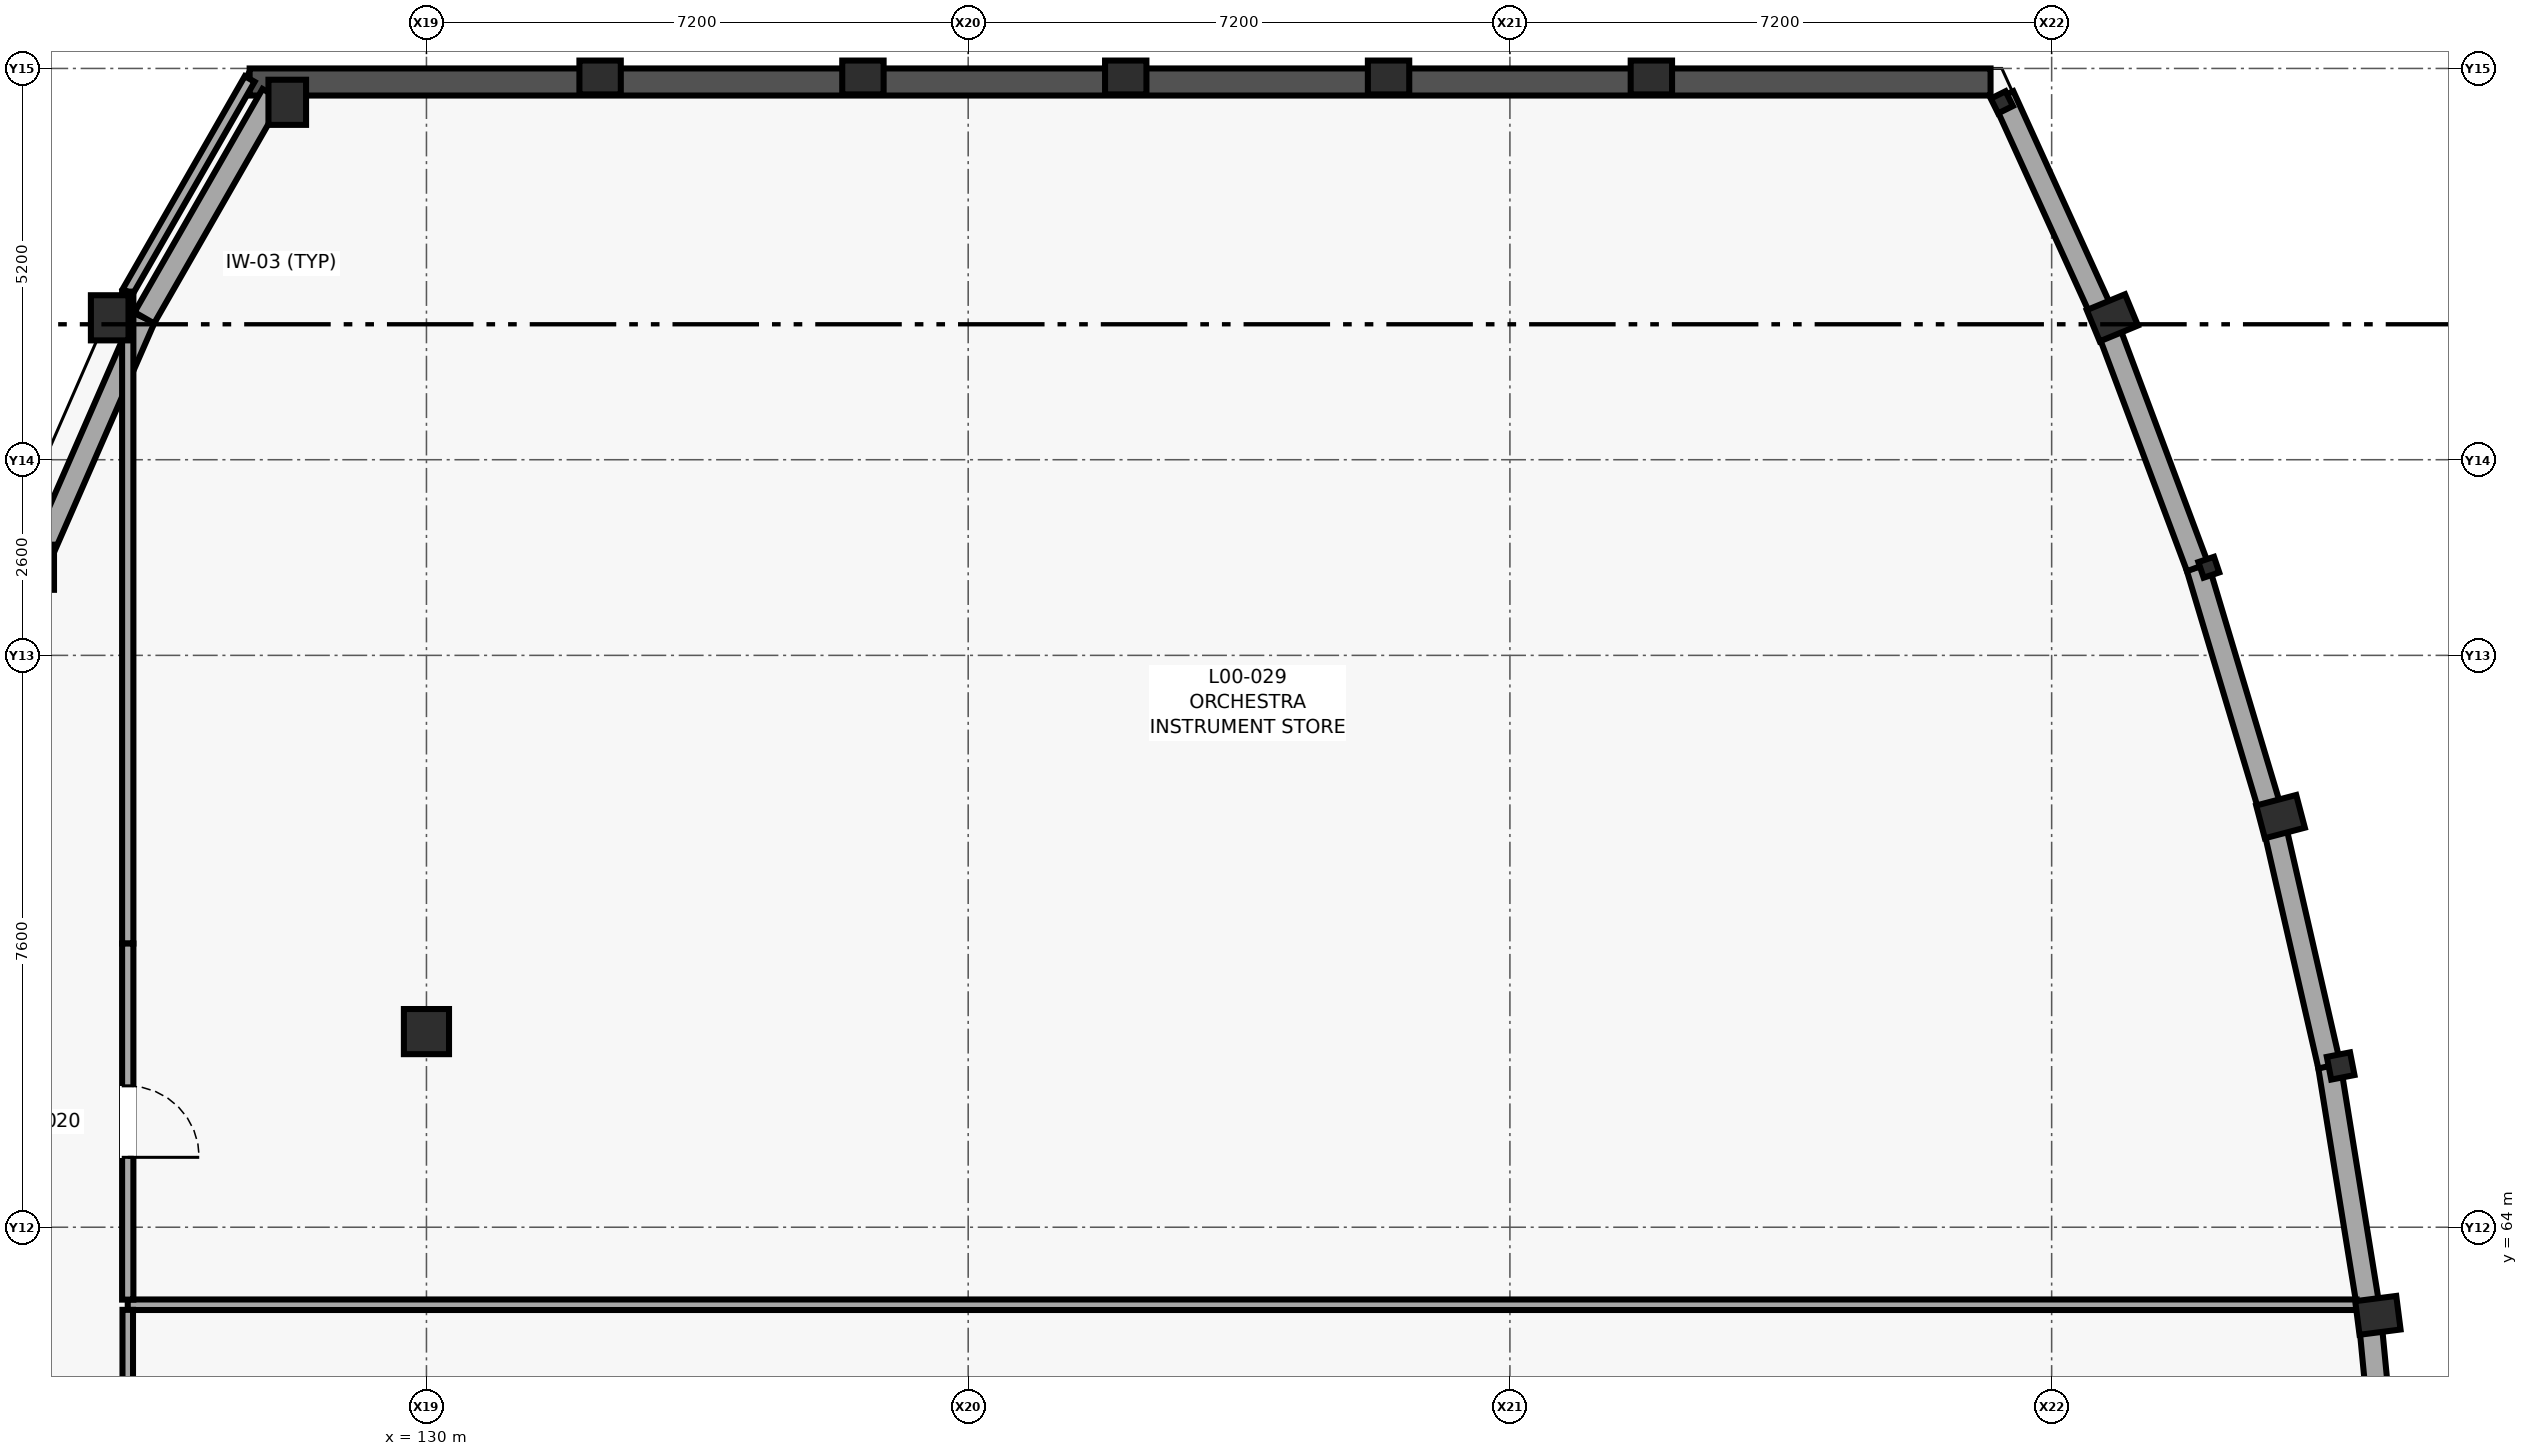
"""IFC4 building model, lengths in metres.
Left out: names, types, materials, properties, quantities, classifications, styles, units other than length and angle.
Written with IfcOpenShell. Run it as: python <this file> out.ifc"""

import sys

from ifc_helpers import new_model, si_unit, direction, frame, frame_2d, origin, origin_2d, place, context, subcontext, project, spatial, rectangle, hollow_circle, i_section, extrude, element, fill, save


model = new_model("IFC4")
c1 = context("Model", 3, precision=1e-05, world=origin(), true_north=direction((0.0, 1.0)))
c2 = subcontext(c1, "Body", "Model", "MODEL_VIEW")
j1 = project(units=[si_unit("LENGTHUNIT", "METRE"), si_unit("PLANEANGLEUNIT", "RADIAN")], contexts=[c1])
p1 = place(None, origin())
s1 = spatial("IfcSite", under=j1, at=p1, CompositionType="ELEMENT")
p2 = place(p1, origin())
s2 = spatial("IfcBuilding", under=s1, at=p2, CompositionType="ELEMENT")
p3 = place(p2, origin())
s3 = spatial("IfcBuildingStorey", under=s2, at=p3, CompositionType="ELEMENT", Elevation=0.0)
for number, where, z_axis, x_axis in (
    (1, (124.8, 72.771, 0.0), (0.0, 0.0, 1.0), (1.0, 0.0, 0.0)),
    (2, (125.79, 76.086, 0.0), (0.0, 0.0, 1.0), (1.0, 0.0, 0.0)),
    (3, (128.15, 78.95, 0.0), (0.0, 0.0, 1.0), (1.0, 0.0, 0.0)),
):
    element("IfcColumn", number, at=place(p3, frame(where, z_axis=z_axis, x_axis=x_axis)), inside=s3, PredefinedType="PILASTER", context=c2, shape_type="SweptSolid", body=[
        extrude(rectangle(XDim=0.5, YDim=0.6, at=origin_2d()), origin(), (0.0, 0.0, 1.0), 4.2),
    ])
p4 = place(p3, frame((130.0, 66.6, 0.0), z_axis=(0.0, 0.0, 1.0), x_axis=(1.0, 0.0, 0.0)))
e4 = element("IfcColumn", 4, at=p4, inside=s3, PredefinedType="COLUMN", context=c2, shape_type="SweptSolid", body=[
    extrude(rectangle(XDim=0.6, YDim=0.6, at=origin_2d()), origin(), (0.0, 0.0, 1.0), 4.2),
])
for number, where, z_axis, x_axis in (
    (5, (132.308, 79.28, 0.0), (0.0, 0.0, 1.0), (0.0, 1.0, 0.0)),
    (6, (135.801, 79.28, 0.0), (0.0, 0.0, 1.0), (0.0, 1.0, 0.0)),
    (7, (139.294, 79.28, 0.0), (0.0, 0.0, 1.0), (0.0, 1.0, 0.0)),
    (8, (142.787, 79.28, 0.0), (0.0, 0.0, 1.0), (0.0, 1.0, 0.0)),
    (9, (146.28, 79.28, 0.0), (0.0, 0.0, 1.0), (0.0, 1.0, 0.0)),
):
    element("IfcColumn", number, at=place(p3, frame(where, z_axis=z_axis, x_axis=x_axis)), inside=s3, PredefinedType="PILASTER", context=c2, shape_type="SweptSolid", body=[
        extrude(rectangle(XDim=0.45, YDim=0.55, at=origin_2d()), origin(), (0.0, 0.0, 1.0), 4.2),
    ])
p5 = place(p3, frame((150.938, 78.95, 0.0), z_axis=(0.0, 0.0, 1.0), x_axis=(-0.44619781311, 0.894934361602, 0.0)))
e10 = element("IfcColumn", 10, at=p5, inside=s3, PredefinedType="PILASTER", context=c2, shape_type="SweptSolid", body=[
    extrude(hollow_circle(Radius=0.11, WallThickness=0.01, at=origin_2d()), origin(), (0.0, 0.0, 1.0), 4.2),
])
p6 = place(p3, frame((152.407, 76.086, 0.0), z_axis=(0.0, 0.0, 1.0), x_axis=(-0.382360914263, 0.92401305794, 0.0)))
e11 = element("IfcColumn", 11, at=p6, inside=s3, PredefinedType="PILASTER", context=c2, shape_type="SweptSolid", body=[
    extrude(rectangle(XDim=0.45, YDim=0.55, at=origin_2d()), origin(), (0.0, 0.0, 1.0), 4.2),
])
p7 = place(p3, frame((153.689, 72.771, 0.0), z_axis=(0.0, 0.0, 1.0), x_axis=(-0.318628456287, 0.947879690069, 0.0)))
e12 = element("IfcColumn", 12, at=p7, inside=s3, PredefinedType="PILASTER", context=c2, shape_type="SweptSolid", body=[
    extrude(hollow_circle(Radius=0.11, WallThickness=0.01, at=origin_2d()), origin(), (0.0, 0.0, 1.0), 4.2),
])
p8 = place(p3, frame((154.642, 69.457, 0.0), z_axis=(0.0, 0.0, 1.0), x_axis=(-0.2549394954, 0.966957007154, 0.0)))
e13 = element("IfcColumn", 13, at=p8, inside=s3, PredefinedType="PILASTER", context=c2, shape_type="SweptSolid", body=[
    extrude(rectangle(XDim=0.45, YDim=0.55, at=origin_2d()), origin(), (0.0, 0.0, 1.0), 4.2),
])
p9 = place(p3, frame((155.441, 66.143, 0.0), z_axis=(0.0, 0.0, 1.0), x_axis=(-0.191151636272, 0.981560518741, 0.0)))
e14 = element("IfcColumn", 14, at=p9, inside=s3, PredefinedType="COLUMN", context=c2, shape_type="SweptSolid", body=[
    extrude(i_section(OverallWidth=0.307, OverallDepth=0.314, WebThickness=0.012, FlangeThickness=0.019, FilletRadius=0.015, at=origin_2d()), origin(), (0.0, 0.0, 1.0), 4.2),
])
p10 = place(p3, frame((155.936, 62.829, 0.0), z_axis=(0.0, 0.0, 1.0), x_axis=(-0.12741083733, 0.991850028246, 0.0)))
e15 = element("IfcColumn", 15, at=p10, inside=s3, PredefinedType="PILASTER", context=c2, shape_type="SweptSolid", body=[
    extrude(rectangle(XDim=0.45, YDim=0.55, at=origin_2d()), origin(), (0.0, 0.0, 1.0), 4.2),
])
p11 = place(p3, frame((156.144, 59.514, 0.0), z_axis=(0.0, 0.0, 1.0), x_axis=(-0.095518246268, 0.995427679256, 0.0)))
e16 = element("IfcWall", 16, at=p11, inside=s3, PredefinedType="SOLIDWALL", context=c2, shape_type="SweptSolid", body=[
    extrude(rectangle(XDim=3.33, YDim=0.3, at=frame_2d((1.665, 0.0))), origin(), (0.0, 0.0, 1.0), 3.68),
])
p12 = place(p11, frame((1.04, 0.0, 1.15)))
e17 = element("IfcOpeningElement", 17, at=p12, cuts=e16, PredefinedType="OPENING", context=c2, shape_type="SweptSolid", body=[
    extrude(rectangle(XDim=1.25, YDim=1.25, at=frame_2d((0.625, 0.625))), frame((0.0, 0.16, 0.0), z_axis=(0.0, -1.0, 0.0), x_axis=(1.0, 0.0, 0.0)), (0.0, 0.0, 1.0), 0.32),
])
p13 = place(p3, frame((155.826, 62.829, 0.0), z_axis=(0.0, 0.0, 1.0), x_axis=(-0.159349054769, 0.987222304623, 0.0)))
e18 = element("IfcWall", 18, at=p13, inside=s3, PredefinedType="SOLIDWALL", context=c2, shape_type="SweptSolid", body=[
    extrude(rectangle(XDim=3.357, YDim=0.3, at=frame_2d((1.678, 0.0))), origin(), (0.0, 0.0, 1.0), 3.68),
])
p14 = place(p3, frame((155.291, 66.143, 0.0), z_axis=(0.0, 0.0, 1.0), x_axis=(-0.223259599234, 0.974759022195, 0.0)))
e19 = element("IfcWall", 19, at=p14, inside=s3, PredefinedType="SOLIDWALL", context=c2, shape_type="SweptSolid", body=[
    extrude(rectangle(XDim=3.4, YDim=0.3, at=frame_2d((1.7, 0.0))), origin(), (0.0, 0.0, 1.0), 3.68),
])
p15 = place(p3, frame((154.532, 69.457, 0.0), z_axis=(0.0, 0.0, 1.0), x_axis=(-0.287011200065, 0.957927226379, 0.0)))
e20 = element("IfcWall", 20, at=p15, inside=s3, PredefinedType="SOLIDWALL", context=c2, shape_type="SweptSolid", body=[
    extrude(rectangle(XDim=3.459, YDim=0.3, at=frame_2d((1.73, 0.0))), origin(), (0.0, 0.0, 1.0), 3.68),
])
p16 = place(p3, frame((153.539, 72.771, 0.0), z_axis=(0.0, 0.0, 1.0), x_axis=(-0.350836219137, 0.936436835746, 0.0)))
e21 = element("IfcWall", 21, at=p16, inside=s3, PredefinedType="SOLIDWALL", context=c2, shape_type="SweptSolid", body=[
    extrude(rectangle(XDim=3.54, YDim=0.3, at=frame_2d((1.77, 0.0))), origin(), (0.0, 0.0, 1.0), 3.68),
])
p17 = place(p3, frame((152.297, 76.086, 0.0), z_axis=(0.0, 0.0, 1.0), x_axis=(-0.414347666712, 0.910118679673, 0.0)))
e22 = element("IfcWall", 22, at=p17, inside=s3, PredefinedType="SOLIDWALL", context=c2, shape_type="SweptSolid", body=[
    extrude(rectangle(XDim=3.241, YDim=0.3, at=frame_2d((1.621, 0.0))), origin(), (0.0, 0.0, 1.0), 3.68),
])
p18 = place(p3, frame((150.788, 79.22, 0.0), z_axis=(0.0, 0.0, 1.0), x_axis=(-1.0, 0.0, 0.0)))
e23 = element("IfcWall", 23, at=p18, inside=s3, PredefinedType="SHEAR", context=c2, shape_type="SweptSolid", body=[
    extrude(rectangle(XDim=23.138, YDim=0.36, at=frame_2d((11.569, 0.0))), origin(), (0.0, 0.0, 1.0), 3.935),
])
p19 = place(p3, frame((126.25, 76.086, 0.0), z_axis=(0.0, 0.0, 1.0), x_axis=(-0.400740958437, -0.916191401526, 0.0)))
e24 = element("IfcWall", 24, at=p19, inside=s3, PredefinedType="SOLIDWALL", context=c2, shape_type="SweptSolid", body=[
    extrude(rectangle(XDim=3.618, YDim=0.3, at=frame_2d((1.809, 0.0))), origin(), (0.0, 0.0, 1.0), 3.68),
])
p20 = place(p3, frame((127.951, 79.053, 0.0), z_axis=(0.0, 0.0, 1.0), x_axis=(-0.497345429475, -0.867552605771, 0.0)))
e25 = element("IfcWall", 25, at=p20, inside=s3, PredefinedType="SOLIDWALL", context=c2, shape_type="SweptSolid", body=[
    extrude(rectangle(XDim=3.42, YDim=0.3, at=frame_2d((1.71, 0.0))), origin(), (0.0, 0.0, 1.0), 3.935),
])
p21 = place(p3, frame((155.653, 62.97, 0.0), z_axis=(0.0, 0.0, 1.0), x_axis=(-1.0, 0.0, 0.0)))
e26 = element("IfcWall", 26, at=p21, inside=s3, PredefinedType="PARTITIONING", context=c2, shape_type="SweptSolid", body=[
    extrude(rectangle(XDim=29.623, YDim=0.14, at=frame_2d((14.812, 0.0))), origin(), (0.0, 0.0, 1.0), 3.93),
])
p22 = place(p3, frame((126.03, 62.902, 0.0), z_axis=(0.0, 0.0, 1.0), x_axis=(0.0, -1.0, 0.0)))
e27 = element("IfcWall", 27, at=p22, inside=s3, PredefinedType="PARTITIONING", context=c2, shape_type="SweptSolid", body=[
    extrude(rectangle(XDim=13.864, YDim=0.14, at=frame_2d((6.932, 0.0))), origin(), (0.0, 0.0, 1.0), 3.93),
])
p23 = place(p22, frame((6.257, 0.0, 0.0)))
e28 = element("IfcOpeningElement", 28, at=p23, cuts=e27, PredefinedType="OPENING", context=c2, shape_type="SweptSolid", body=[
    extrude(rectangle(XDim=1.35, YDim=2.25, at=frame_2d((0.675, 1.125))), frame((0.0, 0.08, 0.0), z_axis=(0.0, -1.0, 0.0), x_axis=(1.0, 0.0, 0.0)), (0.0, 0.0, 1.0), 0.16),
])
p24 = place(p22, frame((4.38, 0.0, 0.0)))
e29 = element("IfcOpeningElement", 29, at=p24, cuts=e27, PredefinedType="OPENING", context=c2, shape_type="SweptSolid", body=[
    extrude(rectangle(XDim=1.35, YDim=2.25, at=frame_2d((0.675, 1.125))), frame((0.0, 0.08, 0.0), z_axis=(0.0, -1.0, 0.0), x_axis=(1.0, 0.0, 0.0)), (0.0, 0.0, 1.0), 0.16),
])
p25 = place(p22, frame((8.307, 0.0, 1.05)))
e30 = element("IfcOpeningElement", 30, at=p25, cuts=e27, PredefinedType="OPENING", context=c2, shape_type="SweptSolid", body=[
    extrude(rectangle(XDim=1.4, YDim=1.05, at=frame_2d((0.7, 0.525))), frame((0.0, 0.08, 0.0), z_axis=(0.0, -1.0, 0.0), x_axis=(1.0, 0.0, 0.0)), (0.0, 0.0, 1.0), 0.16),
])
p26 = place(p3, frame((127.651, 79.26, 0.0), z_axis=(0.0, 0.0, 1.0), x_axis=(-0.497534508733, -0.867444184152, 0.0)))
e31 = element("IfcWall", 31, at=p26, inside=s3, PredefinedType="PARTITIONING", context=c2, shape_type="SweptSolid", body=[
    extrude(rectangle(XDim=3.258, YDim=0.15, at=frame_2d((1.629, 0.0))), origin(), (0.0, 0.0, 1.0), 3.93),
])
p27 = place(p3, frame((126.03, 76.434, 0.0), z_axis=(0.0, 0.0, 1.0), x_axis=(0.0, -1.0, 0.0)))
e32 = element("IfcWall", 32, at=p27, inside=s3, PredefinedType="PARTITIONING", context=c2, shape_type="SweptSolid", body=[
    extrude(rectangle(XDim=8.664, YDim=0.15, at=frame_2d((4.332, 0.0))), origin(), (0.0, 0.0, 1.0), 3.93),
])
p28 = place(p3, frame((126.03, 67.77, 0.0), z_axis=(0.0, 0.0, 1.0), x_axis=(0.0, -1.0, 0.0)))
e33 = element("IfcWall", 33, at=p28, inside=s3, PredefinedType="PARTITIONING", context=c2, shape_type="SweptSolid", body=[
    extrude(rectangle(XDim=4.732, YDim=0.15, at=frame_2d((2.366, 0.0))), origin(), (0.0, 0.0, 1.0), 3.93),
])
p29 = place(p28, frame((1.891, 0.0, 0.0)))
e34 = element("IfcOpeningElement", 34, at=p29, cuts=e33, PredefinedType="OPENING", context=c2, shape_type="SweptSolid", body=[
    extrude(rectangle(XDim=0.95, YDim=2.1, at=frame_2d((0.475, 1.05))), frame((0.0, 0.085, 0.0), z_axis=(0.0, -1.0, 0.0), x_axis=(1.0, 0.0, 0.0)), (0.0, 0.0, 1.0), 0.17),
])
p30 = place(p29, origin())
e35 = element("IfcDoor", 35, at=p30, inside=s3, OperationType="SINGLE_SWING_RIGHT", PredefinedType="DOOR", context=c2, shape_type="SweptSolid", body=[
    extrude(rectangle(XDim=0.95, YDim=2.1, at=frame_2d((0.475, 1.05))), frame((0.0, 0.025, 0.0), z_axis=(0.0, -1.0, 0.0), x_axis=(1.0, 0.0, 0.0)), (0.0, 0.0, 1.0), 0.05),
])
fill(e34, e35)
save(model, sys.argv[1])
